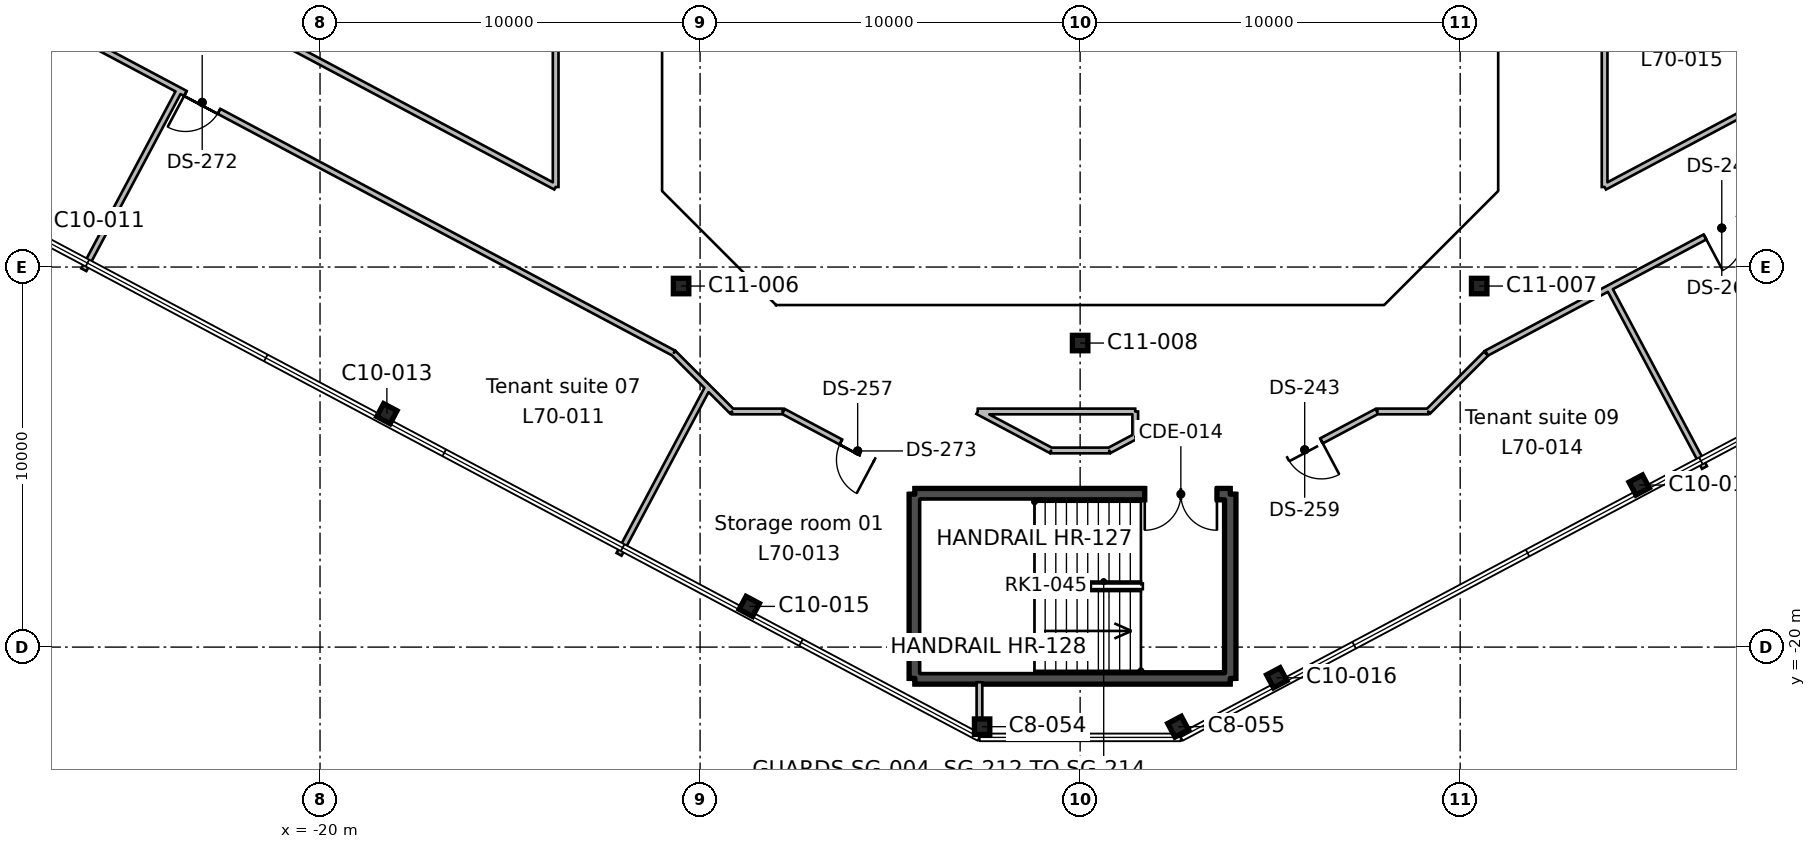
"""IFC4 building model, lengths in metres.
Left out: names, types, materials, properties, quantities, classifications, styles, units other than length and angle.
Written with IfcOpenShell. Run it as: python <this file> out.ifc"""

import sys

from ifc_helpers import new_model, si_unit, direction, frame, frame_2d, origin, origin_2d, place, context, subcontext, project, spatial, rectangle, hollow_rectangle, i_section, extrude, element, fill, save


model = new_model("IFC4")
c1 = context("Model", 3, precision=1e-05, world=origin(), true_north=direction((0.0, 1.0)))
c2 = subcontext(c1, "Body", "Model", "MODEL_VIEW")
j1 = project(units=[si_unit("LENGTHUNIT", "METRE"), si_unit("PLANEANGLEUNIT", "RADIAN")], contexts=[c1])
p1 = place(None, origin())
s1 = spatial("IfcSite", under=j1, at=p1, CompositionType="ELEMENT")
p2 = place(p1, origin())
s2 = spatial("IfcBuilding", under=s1, at=p2, CompositionType="ELEMENT")
p3 = place(p2, frame((0.0, 0.0, 308.7)))
s3 = spatial("IfcBuildingStorey", under=s2, at=p3, CompositionType="ELEMENT", Elevation=308.7)
for number, where, z_axis, x_axis in (
    (1, (-2.579, -22.094, 0.0), (0.0, 0.0, 1.0), (1.0, 0.0, 0.0)),
    (2, (2.579, -22.094, 0.0), (0.0, 0.0, 1.0), (0.883, 0.469, 0.0)),
):
    element("IfcColumn", number, at=place(p3, frame(where, z_axis=z_axis, x_axis=x_axis)), inside=s3, PredefinedType="COLUMN", context=c2, shape_type="SweptSolid", body=[
        extrude(i_section(OverallWidth=0.404, OverallDepth=0.406, WebThickness=0.027, FlangeThickness=0.044, FilletRadius=0.015, at=origin_2d()), origin(), (0.0, 0.0, 1.0), 3.9),
    ])
for number, where, z_axis, x_axis in (
    (3, (5.174, -20.807, 0.0), (0.0, 0.0, 1.0), (0.883, 0.469, 0.0)),
    (4, (-8.705, -18.929, 0.0), (0.0, 0.0, 1.0), (0.883, -0.469, 0.0)),
    (5, (14.71, -15.736, 0.0), (0.0, 0.0, 1.0), (0.883, 0.469, 0.0)),
    (6, (-18.241, -13.858, 0.0), (0.0, 0.0, 1.0), (0.883, -0.469, 0.0)),
):
    element("IfcColumn", number, at=place(p3, frame(where, z_axis=z_axis, x_axis=x_axis)), inside=s3, PredefinedType="COLUMN", context=c2, shape_type="SweptSolid", body=[
        extrude(i_section(OverallWidth=0.399, OverallDepth=0.386, WebThickness=0.021, FlangeThickness=0.033, FilletRadius=0.015, at=origin_2d()), origin(), (0.0, 0.0, 1.0), 3.9),
    ])
for number, where, z_axis, x_axis in (
    (7, (0.0, -12.0, 0.0), (0.0, 0.0, 1.0), (1.0, 0.0, 0.0)),
    (8, (-10.5, -10.5, 0.0), (0.0, 0.0, 1.0), (1.0, 0.0, 0.0)),
    (9, (10.5, -10.5, 0.0), (0.0, 0.0, 1.0), (1.0, 0.0, 0.0)),
):
    element("IfcColumn", number, at=place(p3, frame(where, z_axis=z_axis, x_axis=x_axis)), inside=s3, PredefinedType="COLUMN", context=c2, shape_type="SweptSolid", body=[
        extrude(hollow_rectangle(XDim=0.406, YDim=0.406, WallThickness=0.009, InnerFilletRadius=0.004, OuterFilletRadius=0.013, at=origin_2d()), origin(), (0.0, 0.0, 1.0), 3.9),
    ])
p4 = place(p3, frame((3.95, -15.975, 0.0), z_axis=(0.0, 0.0, 1.0), x_axis=(0.0, -1.0, 0.0)))
e10 = element("IfcWall", 10, at=p4, inside=s3, PredefinedType="SHEAR", context=c2, shape_type="SweptSolid", body=[
    extrude(rectangle(XDim=4.85, YDim=0.3, at=frame_2d((2.425, 0.0))), origin(), (0.0, 0.0, 1.0), 3.9),
])
p5 = place(p3, frame((3.95, -20.825, 0.0), z_axis=(0.0, 0.0, 1.0), x_axis=(-1.0, 0.0, 0.0)))
e11 = element("IfcWall", 11, at=p5, inside=s3, PredefinedType="SHEAR", context=c2, shape_type="SweptSolid", body=[
    extrude(rectangle(XDim=8.3, YDim=0.3, at=frame_2d((4.15, 0.0))), origin(), (0.0, 0.0, 1.0), 3.9),
])
p6 = place(p3, frame((-4.35, -20.825, 0.0), z_axis=(0.0, 0.0, 1.0), x_axis=(0.0, 1.0, 0.0)))
e12 = element("IfcWall", 12, at=p6, inside=s3, PredefinedType="SHEAR", context=c2, shape_type="SweptSolid", body=[
    extrude(rectangle(XDim=4.85, YDim=0.3, at=frame_2d((2.425, 0.0))), origin(), (0.0, 0.0, 1.0), 3.9),
])
p7 = place(p3, frame((-4.35, -15.975, 0.0), z_axis=(0.0, 0.0, 1.0), x_axis=(1.0, 0.0, 0.0)))
e13 = element("IfcWall", 13, at=p7, inside=s3, PredefinedType="SHEAR", context=c2, shape_type="SweptSolid", body=[
    extrude(rectangle(XDim=8.3, YDim=0.3, at=frame_2d((4.15, 0.0))), origin(), (0.0, 0.0, 1.0), 3.9),
])
p8 = place(p7, frame((6.05, 0.0, 0.0)))
e14 = element("IfcOpeningElement", 14, at=p8, cuts=e13, PredefinedType="OPENING", context=c2, shape_type="SweptSolid", body=[
    extrude(rectangle(XDim=1.9, YDim=2.1, at=frame_2d((0.95, 1.05))), frame((0.0, 0.16, 0.0), z_axis=(0.0, -1.0, 0.0), x_axis=(1.0, 0.0, 0.0)), (0.0, 0.0, 1.0), 0.32),
])
p9 = place(p3, frame((-13.8, 9.16, 0.0), z_axis=(0.0, 0.0, 1.0), x_axis=(0.0, -1.0, 0.0)))
e15 = element("IfcWall", 15, at=p9, inside=s3, PredefinedType="PARTITIONING", context=c2, shape_type="SweptSolid", body=[
    extrude(rectangle(XDim=17.055, YDim=0.15, at=frame_2d((8.527, 0.0))), origin(), (0.0, 0.0, 1.0), 3.54),
])
p10 = place(p3, frame((-13.8, -7.895, 0.0), z_axis=(0.0, 0.0, 1.0), x_axis=(-0.882949728524, 0.469467546161, 0.0)))
e16 = element("IfcWall", 16, at=p10, inside=s3, PredefinedType="PARTITIONING", context=c2, shape_type="SweptSolid", body=[
    extrude(rectangle(XDim=35.527, YDim=0.15, at=frame_2d((17.764, 0.0))), origin(), (0.0, 0.0, 1.0), 3.54),
])
p11 = place(p3, frame((-23.702, -5.348, 0.0), z_axis=(0.0, 0.0, 1.0), x_axis=(-0.469522163358, -0.882920686198, 0.0)))
e17 = element("IfcWall", 17, at=p11, inside=s3, PredefinedType="PARTITIONING", context=c2, shape_type="SweptSolid", body=[
    extrude(rectangle(XDim=5.351, YDim=0.15, at=frame_2d((2.675, 0.0))), origin(), (0.0, 0.0, 1.0), 3.54),
])
p12 = place(p3, frame((-10.695, -12.264, 0.0), z_axis=(0.0, 0.0, 1.0), x_axis=(-0.882951614076, 0.469463999899, 0.0)))
e18 = element("IfcWall", 18, at=p12, inside=s3, PredefinedType="PARTITIONING", context=c2, shape_type="SweptSolid", body=[
    extrude(rectangle(XDim=39.982, YDim=0.15, at=frame_2d((19.991, 0.0))), origin(), (0.0, 0.0, 1.0), 3.54),
])
p13 = place(p12, frame((19.45, 0.0, 0.0)))
e19 = element("IfcOpeningElement", 19, at=p13, cuts=e18, PredefinedType="OPENING", context=c2, shape_type="SweptSolid", body=[
    extrude(rectangle(XDim=1.0, YDim=2.1, at=frame_2d((0.5, 1.05))), frame((0.0, 0.085, 0.0), z_axis=(0.0, -1.0, 0.0), x_axis=(1.0, 0.0, 0.0)), (0.0, 0.0, 1.0), 0.17),
])
p14 = place(p12, frame((13.55, 0.0, 0.0)))
e20 = element("IfcOpeningElement", 20, at=p14, cuts=e18, PredefinedType="OPENING", context=c2, shape_type="SweptSolid", body=[
    extrude(rectangle(XDim=1.0, YDim=2.1, at=frame_2d((0.5, 1.05))), frame((0.0, 0.085, 0.0), z_axis=(0.0, -1.0, 0.0), x_axis=(1.0, 0.0, 0.0)), (0.0, 0.0, 1.0), 0.17),
])
p15 = place(p3, frame((-9.794, -13.165, 0.0), z_axis=(0.0, 0.0, 1.0), x_axis=(-0.469669090987, -0.882842536906, 0.0)))
e21 = element("IfcWall", 21, at=p15, inside=s3, PredefinedType="PARTITIONING", context=c2, shape_type="SweptSolid", body=[
    extrude(rectangle(XDim=4.978, YDim=0.15, at=frame_2d((2.489, 0.0))), origin(), (0.0, 0.0, 1.0), 3.54),
])
p16 = place(p3, frame((-9.785, -13.175, 0.0), z_axis=(0.0, 0.0, 1.0), x_axis=(-0.706727533866, 0.707485825212, 0.0)))
e22 = element("IfcWall", 22, at=p16, inside=s3, PredefinedType="PARTITIONING", context=c2, shape_type="SweptSolid", body=[
    extrude(rectangle(XDim=1.288, YDim=0.15, at=frame_2d((0.644, 0.0))), origin(), (0.0, 0.0, 1.0), 3.54),
])
p17 = place(p3, frame((-7.828, -13.8, 0.0), z_axis=(0.0, 0.0, 1.0), x_axis=(-1.0, 0.0, 0.0)))
e23 = element("IfcWall", 23, at=p17, inside=s3, PredefinedType="PARTITIONING", context=c2, shape_type="SweptSolid", body=[
    extrude(rectangle(XDim=1.332, YDim=0.15, at=frame_2d((0.666, 0.0))), origin(), (0.0, 0.0, 1.0), 3.54),
])
p18 = place(p3, frame((-9.16, -13.8, 0.0), z_axis=(0.0, 0.0, 1.0), x_axis=(-0.707106781187, 0.707106781187, 0.0)))
e24 = element("IfcWall", 24, at=p18, inside=s3, PredefinedType="PARTITIONING", context=c2, shape_type="SweptSolid", body=[
    extrude(rectangle(XDim=0.884, YDim=0.15, at=frame_2d((0.442, 0.0))), origin(), (0.0, 0.0, 1.0), 3.54),
])
p19 = place(p3, frame((-3.955, -15.848, 0.0), z_axis=(0.0, 0.0, 1.0), x_axis=(-0.882965680306, 0.469437543665, 0.0)))
e25 = element("IfcWall", 25, at=p19, inside=s3, PredefinedType="PARTITIONING", context=c2, shape_type="SweptSolid", body=[
    extrude(rectangle(XDim=4.362, YDim=0.15, at=frame_2d((2.181, 0.0))), origin(), (0.0, 0.0, 1.0), 3.54),
])
p20 = place(p19, frame((1.65, 0.0, 0.0)))
e26 = element("IfcOpeningElement", 26, at=p20, cuts=e25, PredefinedType="OPENING", context=c2, shape_type="SweptSolid", body=[
    extrude(rectangle(XDim=1.0, YDim=2.1, at=frame_2d((0.5, 1.05))), frame((0.0, 0.085, 0.0), z_axis=(0.0, -1.0, 0.0), x_axis=(1.0, 0.0, 0.0)), (0.0, 0.0, 1.0), 0.17),
])
p21 = place(p3, frame((-2.649, -20.925, 0.0), z_axis=(0.0, 0.0, 1.0), x_axis=(0.0, -1.0, 0.0)))
e27 = element("IfcWall", 27, at=p21, inside=s3, PredefinedType="PARTITIONING", context=c2, shape_type="SweptSolid", body=[
    extrude(rectangle(XDim=0.966, YDim=0.15, at=frame_2d((0.483, 0.0))), origin(), (0.0, 0.0, 1.0), 3.54),
])
p22 = place(p3, frame((7.807, -13.8, 0.0), z_axis=(0.0, 0.0, 1.0), x_axis=(-0.883014998399, -0.469344769442, 0.0)))
e28 = element("IfcWall", 28, at=p22, inside=s3, PredefinedType="PARTITIONING", context=c2, shape_type="SweptSolid", body=[
    extrude(rectangle(XDim=4.363, YDim=0.15, at=frame_2d((2.182, 0.0))), origin(), (0.0, 0.0, 1.0), 3.54),
])
p23 = place(p22, frame((1.65, 0.0, 0.0)))
e29 = element("IfcOpeningElement", 29, at=p23, cuts=e28, PredefinedType="OPENING", context=c2, shape_type="SweptSolid", body=[
    extrude(rectangle(XDim=1.0, YDim=2.1, at=frame_2d((0.5, 1.05))), frame((0.0, 0.085, 0.0), z_axis=(0.0, -1.0, 0.0), x_axis=(1.0, 0.0, 0.0)), (0.0, 0.0, 1.0), 0.17),
])
p24 = place(p3, frame((10.68, -12.28, 0.0), z_axis=(0.0, 0.0, 1.0), x_axis=(-0.707106781187, -0.707106781187, 0.0)))
e30 = element("IfcWall", 30, at=p24, inside=s3, PredefinedType="PARTITIONING", context=c2, shape_type="SweptSolid", body=[
    extrude(rectangle(XDim=2.15, YDim=0.15, at=frame_2d((1.075, 0.0))), origin(), (0.0, 0.0, 1.0), 3.54),
])
p25 = place(p3, frame((9.16, -13.8, 0.0), z_axis=(0.0, 0.0, 1.0), x_axis=(-1.0, 0.0, 0.0)))
e31 = element("IfcWall", 31, at=p25, inside=s3, PredefinedType="PARTITIONING", context=c2, shape_type="SweptSolid", body=[
    extrude(rectangle(XDim=1.339, YDim=0.15, at=frame_2d((0.669, 0.0))), origin(), (0.0, 0.0, 1.0), 3.54),
])
p26 = place(p3, frame((13.917, -10.552, 0.0), z_axis=(0.0, 0.0, 1.0), x_axis=(0.469581183092, -0.882889297979, 0.0)))
e32 = element("IfcWall", 32, at=p26, inside=s3, PredefinedType="PARTITIONING", context=c2, shape_type="SweptSolid", body=[
    extrude(rectangle(XDim=5.349, YDim=0.15, at=frame_2d((2.675, 0.0))), origin(), (0.0, 0.0, 1.0), 3.54),
])
p27 = place(p3, frame((23.108, -5.664, 0.0), z_axis=(0.0, 0.0, 1.0), x_axis=(-0.882952650817, -0.469462050027, 0.0)))
e33 = element("IfcWall", 33, at=p27, inside=s3, PredefinedType="PARTITIONING", context=c2, shape_type="SweptSolid", body=[
    extrude(rectangle(XDim=14.058, YDim=0.15, at=frame_2d((7.029, 0.0))), origin(), (0.0, 0.0, 1.0), 3.54),
])
p28 = place(p27, frame((6.55, 0.0, 0.0)))
e34 = element("IfcOpeningElement", 34, at=p28, cuts=e33, PredefinedType="OPENING", context=c2, shape_type="SweptSolid", body=[
    extrude(rectangle(XDim=1.0, YDim=2.1, at=frame_2d((0.5, 1.05))), frame((0.0, 0.085, 0.0), z_axis=(0.0, -1.0, 0.0), x_axis=(1.0, 0.0, 0.0)), (0.0, 0.0, 1.0), 0.17),
])
p29 = place(p3, frame((-0.766, -14.826, 0.0), z_axis=(0.0, 0.0, 1.0), x_axis=(1.0, 0.0, 0.0)))
e35 = element("IfcWall", 35, at=p29, inside=s3, PredefinedType="PARTITIONING", context=c2, shape_type="SweptSolid", body=[
    extrude(rectangle(XDim=1.532, YDim=0.15, at=frame_2d((0.766, 0.0))), origin(), (0.0, 0.0, 1.0), 3.54),
])
p30 = place(p3, frame((0.766, -14.826, 0.0), z_axis=(0.0, 0.0, 1.0), x_axis=(0.882727784354, 0.469884729194, 0.0)))
e36 = element("IfcWall", 36, at=p30, inside=s3, PredefinedType="PARTITIONING", context=c2, shape_type="SweptSolid", body=[
    extrude(rectangle(XDim=0.775, YDim=0.15, at=frame_2d((0.387, 0.0))), origin(), (0.0, 0.0, 1.0), 3.54),
])
p31 = place(p3, frame((1.45, -14.462, 0.0), z_axis=(0.0, 0.0, 1.0), x_axis=(0.0, 1.0, 0.0)))
e37 = element("IfcWall", 37, at=p31, inside=s3, PredefinedType="PARTITIONING", context=c2, shape_type="SweptSolid", body=[
    extrude(rectangle(XDim=0.662, YDim=0.15, at=frame_2d((0.331, 0.0))), origin(), (0.0, 0.0, 1.0), 3.54),
])
p32 = place(p3, frame((1.45, -13.8, 0.0), z_axis=(0.0, 0.0, 1.0), x_axis=(-1.0, 0.0, 0.0)))
e38 = element("IfcWall", 38, at=p32, inside=s3, PredefinedType="PARTITIONING", context=c2, shape_type="SweptSolid", body=[
    extrude(rectangle(XDim=4.145, YDim=0.15, at=frame_2d((2.073, 0.0))), origin(), (0.0, 0.0, 1.0), 3.54),
])
p33 = place(p3, frame((-2.695, -13.8, 0.0), z_axis=(0.0, 0.0, 1.0), x_axis=(0.882902945881, -0.469555521908, 0.0)))
e39 = element("IfcWall", 39, at=p33, inside=s3, PredefinedType="PARTITIONING", context=c2, shape_type="SweptSolid", body=[
    extrude(rectangle(XDim=2.185, YDim=0.15, at=frame_2d((1.092, 0.0))), origin(), (0.0, 0.0, 1.0), 3.54),
])
p34 = place(p3, frame((13.8, -7.895, 0.0), z_axis=(0.0, 0.0, 1.0), x_axis=(0.0, 1.0, 0.0)))
e40 = element("IfcWall", 40, at=p34, inside=s3, PredefinedType="PARTITIONING", context=c2, shape_type="SweptSolid", body=[
    extrude(rectangle(XDim=11.762, YDim=0.15, at=frame_2d((5.881, 0.0))), origin(), (0.0, 0.0, 1.0), 3.54),
])
p35 = place(p34, frame((5.35, 0.0, 0.0)))
e41 = element("IfcOpeningElement", 41, at=p35, cuts=e40, PredefinedType="OPENING", context=c2, shape_type="SweptSolid", body=[
    extrude(rectangle(XDim=1.0, YDim=2.1, at=frame_2d((0.5, 1.05))), frame((0.0, 0.085, 0.0), z_axis=(0.0, -1.0, 0.0), x_axis=(1.0, 0.0, 0.0)), (0.0, 0.0, 1.0), 0.17),
])
p36 = place(p3, frame((24.371, -2.275, 0.0), z_axis=(0.0, 0.0, 1.0), x_axis=(-0.882968611929, -0.46943202953, 0.0)))
e42 = element("IfcWall", 42, at=p36, inside=s3, PredefinedType="PARTITIONING", context=c2, shape_type="SweptSolid", body=[
    extrude(rectangle(XDim=11.972, YDim=0.15, at=frame_2d((5.986, 0.0))), origin(), (0.0, 0.0, 1.0), 3.54),
])
p37 = place(p8, frame((1.9, 0.0, 0.0), z_axis=(0.0, 0.0, 1.0), x_axis=(-1.0, 0.0, 0.0)))
e43 = element("IfcDoor", 43, at=p37, inside=s3, OperationType="DOUBLE_DOOR_SINGLE_SWING", PredefinedType="DOOR", context=c2, shape_type="SweptSolid", body=[
    extrude(rectangle(XDim=1.9, YDim=2.1, at=frame_2d((0.95, 1.05))), frame((0.0, 0.025, 0.0), z_axis=(0.0, -1.0, 0.0), x_axis=(1.0, 0.0, 0.0)), (0.0, 0.0, 1.0), 0.05),
])
fill(e14, e43)
p38 = place(p23, origin())
e44 = element("IfcDoor", 44, at=p38, inside=s3, OperationType="SINGLE_SWING_LEFT", PredefinedType="DOOR", context=c2, shape_type="SweptSolid", body=[
    extrude(rectangle(XDim=1.0, YDim=2.1, at=frame_2d((0.5, 1.05))), frame((0.0, 0.025, 0.0), z_axis=(0.0, -1.0, 0.0), x_axis=(1.0, 0.0, 0.0)), (0.0, 0.0, 1.0), 0.05),
])
fill(e29, e44)
p39 = place(p28, origin())
e45 = element("IfcDoor", 45, at=p39, inside=s3, OperationType="SINGLE_SWING_RIGHT", PredefinedType="DOOR", context=c2, shape_type="SweptSolid", body=[
    extrude(rectangle(XDim=1.0, YDim=2.1, at=frame_2d((0.5, 1.05))), frame((0.0, 0.025, 0.0), z_axis=(0.0, -1.0, 0.0), x_axis=(1.0, 0.0, 0.0)), (0.0, 0.0, 1.0), 0.05),
])
fill(e34, e45)
p40 = place(p14, origin())
e46 = element("IfcDoor", 46, at=p40, inside=s3, OperationType="SINGLE_SWING_RIGHT", PredefinedType="DOOR", context=c2, shape_type="SweptSolid", body=[
    extrude(rectangle(XDim=1.0, YDim=2.1, at=frame_2d((0.5, 1.05))), frame((0.0, 0.025, 0.0), z_axis=(0.0, -1.0, 0.0), x_axis=(1.0, 0.0, 0.0)), (0.0, 0.0, 1.0), 0.05),
])
fill(e20, e46)
p41 = place(p20, origin())
e47 = element("IfcDoor", 47, at=p41, inside=s3, OperationType="SINGLE_SWING_LEFT", PredefinedType="DOOR", context=c2, shape_type="SweptSolid", body=[
    extrude(rectangle(XDim=1.0, YDim=2.1, at=frame_2d((0.5, 1.05))), frame((0.0, 0.025, 0.0), z_axis=(0.0, -1.0, 0.0), x_axis=(1.0, 0.0, 0.0)), (0.0, 0.0, 1.0), 0.05),
])
fill(e26, e47)
save(model, sys.argv[1])
